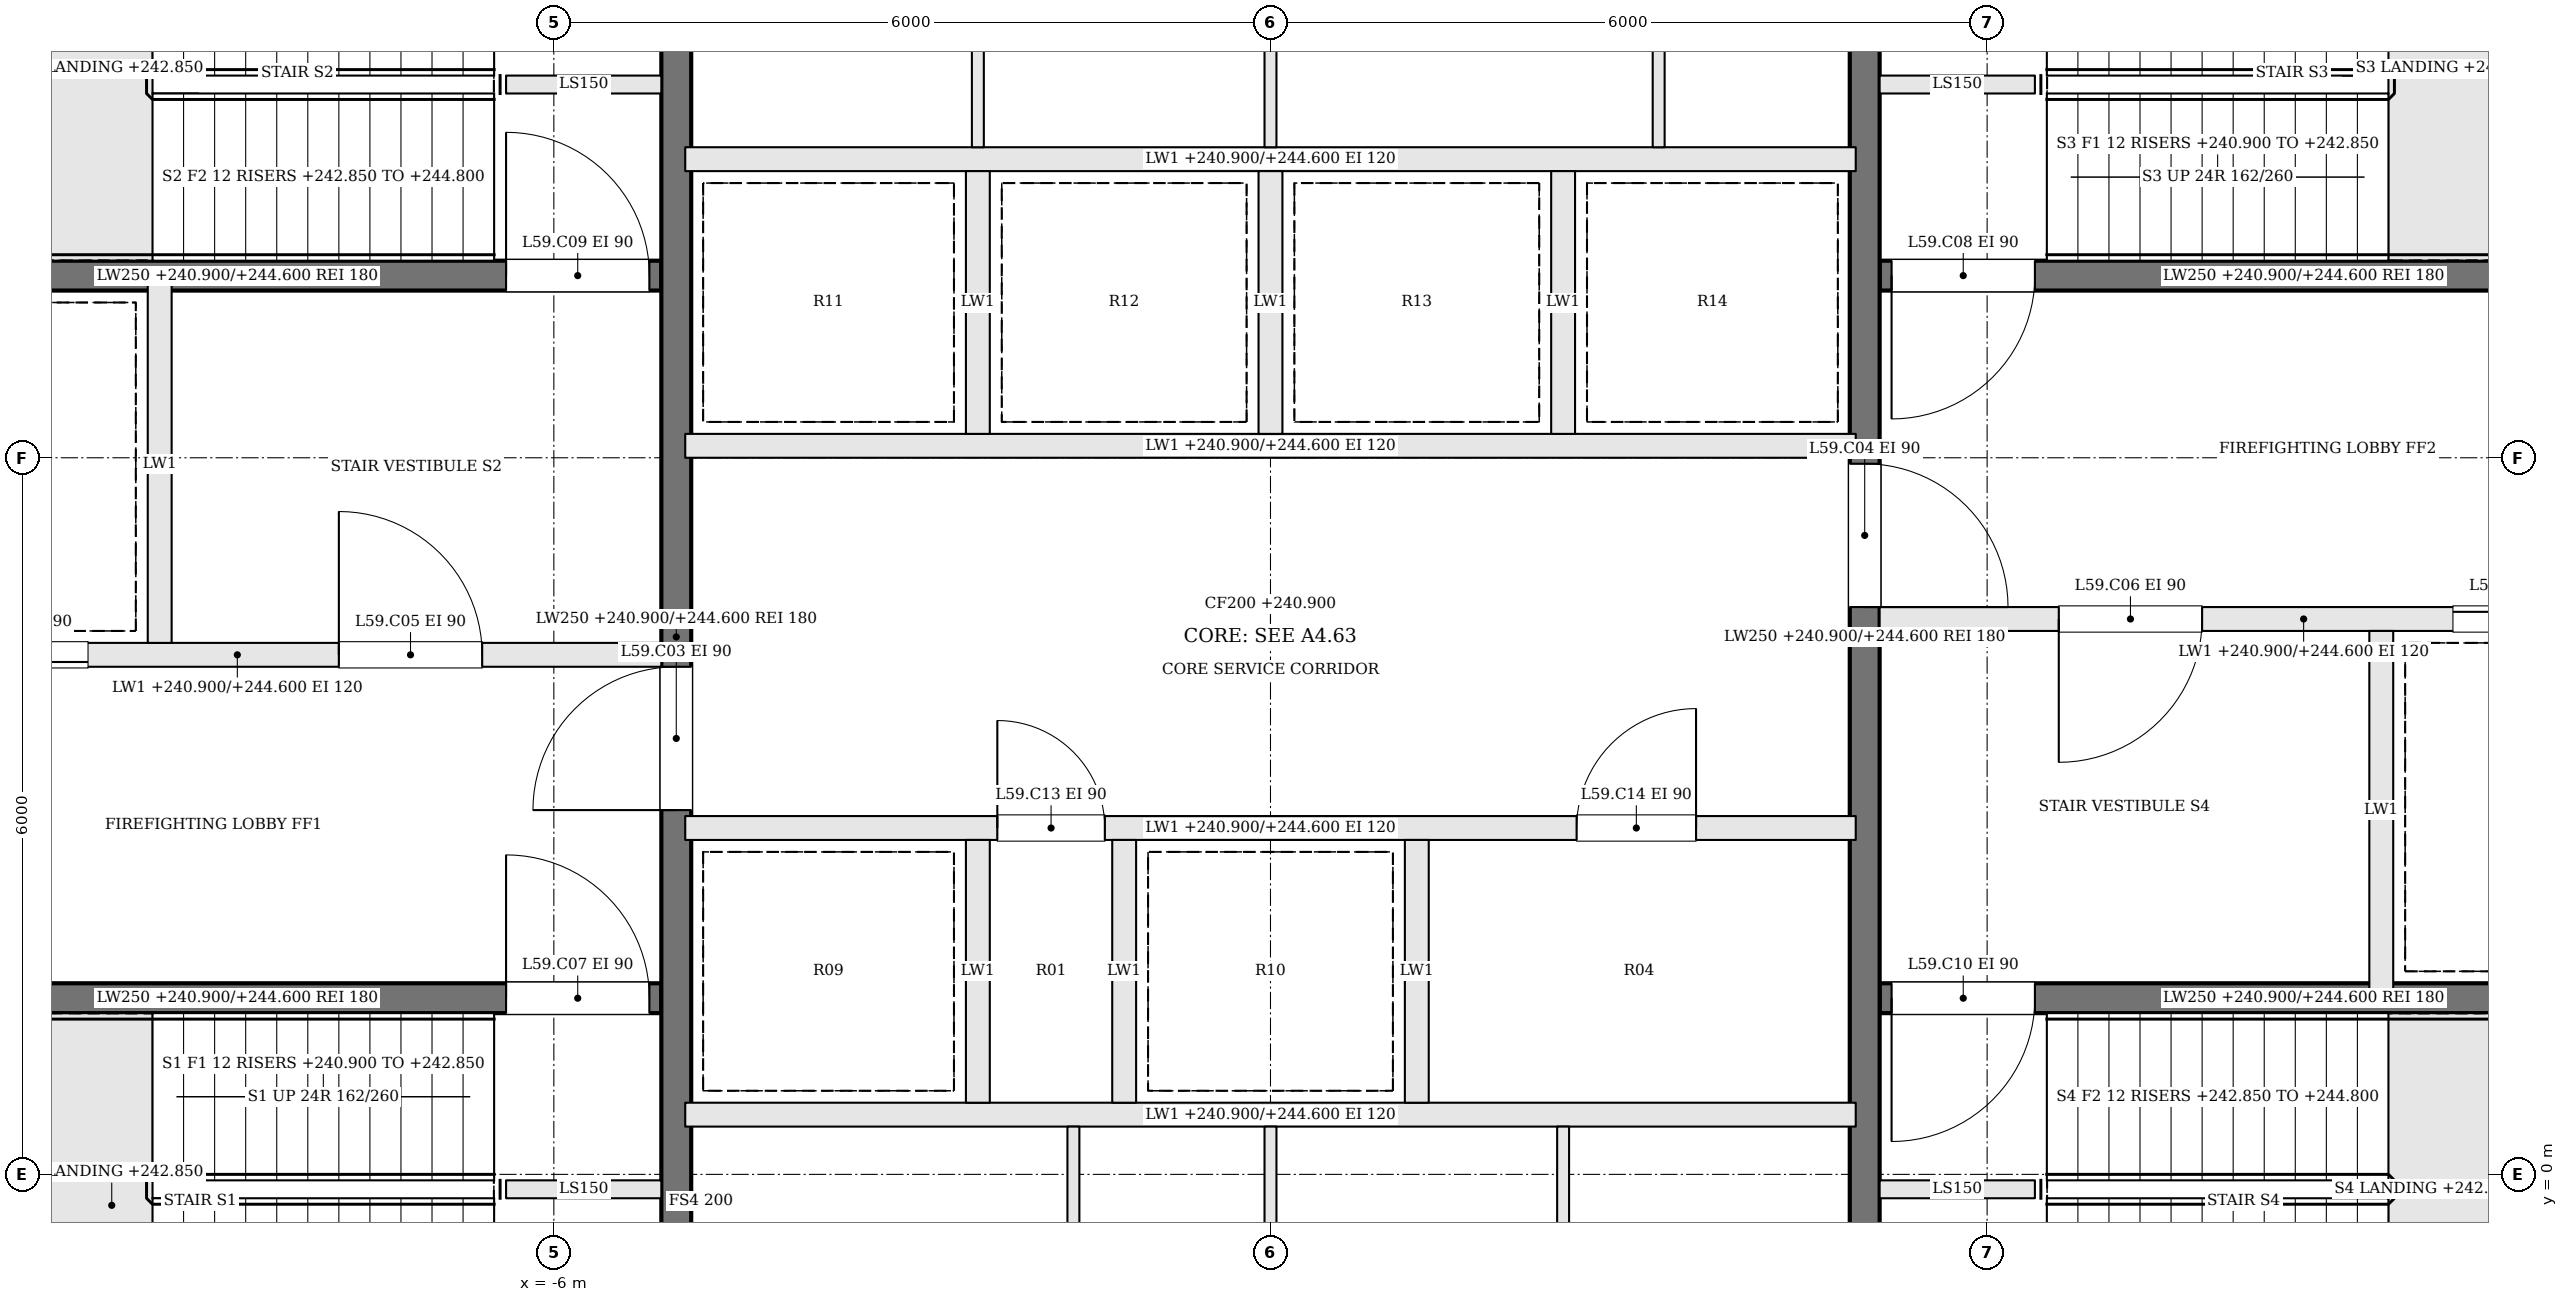
"""IFC4 building model, lengths in metres.
Left out: names, types, materials, properties, quantities, classifications, styles, units other than length and angle.
Written with IfcOpenShell. Run it as: python <this file> out.ifc"""

import sys

from ifc_helpers import new_model, si_unit, direction, frame, frame_2d, origin, place, context, subcontext, project, spatial, rectangle, extrude, element, fill, save


model = new_model("IFC4")
c1 = context("Model", 3, precision=1e-05, world=origin(), true_north=direction((0.0, 1.0)))
c2 = subcontext(c1, "Body", "Model", "MODEL_VIEW")
j1 = project(units=[si_unit("LENGTHUNIT", "METRE"), si_unit("PLANEANGLEUNIT", "RADIAN")], contexts=[c1])
p1 = place(None, origin())
s1 = spatial("IfcSite", under=j1, at=p1, CompositionType="ELEMENT")
p2 = place(p1, origin())
s2 = spatial("IfcBuilding", under=s1, at=p2, CompositionType="ELEMENT")
p3 = place(p2, frame((0.0, 0.0, 240.9)))
s3 = spatial("IfcBuildingStorey", under=s2, at=p3, CompositionType="ELEMENT", Elevation=240.9)
for number, where, z_axis, x_axis in (
    (1, (-6.4, -0.125, 0.0), (0.0, 0.0, 1.0), (1.0, 0.0, 0.0)),
    (2, (6.4, 9.125, 0.0), (0.0, 0.0, 1.0), (-1.0, 0.0, 0.0)),
    (3, (-6.4, 9.125, 0.0), (0.0, 0.0, 1.0), (1.0, 0.0, 0.0)),
    (4, (6.4, -0.125, 0.0), (0.0, 0.0, 1.0), (-1.0, 0.0, 0.0)),
):
    element("IfcWall", number, at=place(p3, frame(where, z_axis=z_axis, x_axis=x_axis)), inside=s3, PredefinedType="SOLIDWALL", context=c2, shape_type="SweptSolid", body=[
        extrude(rectangle(XDim=1.3, YDim=0.15, at=frame_2d((0.65, 0.0))), origin(), (0.0, 0.0, 1.0), 3.7),
    ])
p4 = place(p3, frame((-12.2, 1.475, 0.0), z_axis=(0.0, 0.0, 1.0), x_axis=(1.0, 0.0, 0.0)))
e5 = element("IfcWall", 5, at=p4, inside=s3, PredefinedType="SOLIDWALL", context=c2, shape_type="SweptSolid", body=[
    extrude(rectangle(XDim=7.1, YDim=0.25, at=frame_2d((3.55, 0.0))), origin(), (0.0, 0.0, 1.0), 3.7),
])
p5 = place(p4, frame((5.8, 0.0, 0.0)))
e6 = element("IfcOpeningElement", 6, at=p5, cuts=e5, PredefinedType="OPENING", context=c2, shape_type="SweptSolid", body=[
    extrude(rectangle(XDim=1.2, YDim=2.1, at=frame_2d((0.6, 1.05))), frame((0.0, 0.135, 0.0), z_axis=(0.0, -1.0, 0.0), x_axis=(1.0, 0.0, 0.0)), (0.0, 0.0, 1.0), 0.27),
])
p6 = place(p3, frame((12.2, 7.525, 0.0), z_axis=(0.0, 0.0, 1.0), x_axis=(-1.0, 0.0, 0.0)))
e7 = element("IfcWall", 7, at=p6, inside=s3, PredefinedType="SOLIDWALL", context=c2, shape_type="SweptSolid", body=[
    extrude(rectangle(XDim=7.1, YDim=0.25, at=frame_2d((3.55, 0.0))), origin(), (0.0, 0.0, 1.0), 3.7),
])
p7 = place(p6, frame((5.8, 0.0, 0.0)))
e8 = element("IfcOpeningElement", 8, at=p7, cuts=e7, PredefinedType="OPENING", context=c2, shape_type="SweptSolid", body=[
    extrude(rectangle(XDim=1.2, YDim=2.1, at=frame_2d((0.6, 1.05))), frame((0.0, 0.135, 0.0), z_axis=(0.0, -1.0, 0.0), x_axis=(1.0, 0.0, 0.0)), (0.0, 0.0, 1.0), 0.27),
])
p8 = place(p3, frame((-12.2, 4.35, 0.0), z_axis=(0.0, 0.0, 1.0), x_axis=(1.0, 0.0, 0.0)))
e9 = element("IfcWall", 9, at=p8, inside=s3, PredefinedType="SOLIDWALL", context=c2, shape_type="SweptSolid", body=[
    extrude(rectangle(XDim=7.1, YDim=0.2, at=frame_2d((3.55, 0.0))), origin(), (0.0, 0.0, 1.0), 3.7),
])
p9 = place(p8, frame((4.4, 0.0, 0.0)))
e10 = element("IfcOpeningElement", 10, at=p9, cuts=e9, PredefinedType="OPENING", context=c2, shape_type="SweptSolid", body=[
    extrude(rectangle(XDim=1.2, YDim=2.1, at=frame_2d((0.6, 1.05))), frame((0.0, 0.11, 0.0), z_axis=(0.0, -1.0, 0.0), x_axis=(1.0, 0.0, 0.0)), (0.0, 0.0, 1.0), 0.22),
])
p10 = place(p8, frame((1.1, 0.0, 0.0)))
e11 = element("IfcOpeningElement", 11, at=p10, cuts=e9, PredefinedType="OPENING", context=c2, shape_type="SweptSolid", body=[
    extrude(rectangle(XDim=1.2, YDim=2.1, at=frame_2d((0.6, 1.05))), frame((0.0, 0.11, 0.0), z_axis=(0.0, -1.0, 0.0), x_axis=(1.0, 0.0, 0.0)), (0.0, 0.0, 1.0), 0.22),
])
p11 = place(p3, frame((12.2, 4.65, 0.0), z_axis=(0.0, 0.0, 1.0), x_axis=(-1.0, 0.0, 0.0)))
e12 = element("IfcWall", 12, at=p11, inside=s3, PredefinedType="SOLIDWALL", context=c2, shape_type="SweptSolid", body=[
    extrude(rectangle(XDim=7.1, YDim=0.2, at=frame_2d((3.55, 0.0))), origin(), (0.0, 0.0, 1.0), 3.7),
])
p12 = place(p11, frame((4.4, 0.0, 0.0)))
e13 = element("IfcOpeningElement", 13, at=p12, cuts=e12, PredefinedType="OPENING", context=c2, shape_type="SweptSolid", body=[
    extrude(rectangle(XDim=1.2, YDim=2.1, at=frame_2d((0.6, 1.05))), frame((0.0, 0.11, 0.0), z_axis=(0.0, -1.0, 0.0), x_axis=(1.0, 0.0, 0.0)), (0.0, 0.0, 1.0), 0.22),
])
p13 = place(p11, frame((1.1, 0.0, 0.0)))
e14 = element("IfcOpeningElement", 14, at=p13, cuts=e12, PredefinedType="OPENING", context=c2, shape_type="SweptSolid", body=[
    extrude(rectangle(XDim=1.2, YDim=2.1, at=frame_2d((0.6, 1.05))), frame((0.0, 0.11, 0.0), z_axis=(0.0, -1.0, 0.0), x_axis=(1.0, 0.0, 0.0)), (0.0, 0.0, 1.0), 0.22),
])
p14 = place(p3, frame((-12.2, 7.525, 0.0), z_axis=(0.0, 0.0, 1.0), x_axis=(1.0, 0.0, 0.0)))
e15 = element("IfcWall", 15, at=p14, inside=s3, PredefinedType="SOLIDWALL", context=c2, shape_type="SweptSolid", body=[
    extrude(rectangle(XDim=7.1, YDim=0.25, at=frame_2d((3.55, 0.0))), origin(), (0.0, 0.0, 1.0), 3.7),
])
p15 = place(p14, frame((5.8, 0.0, 0.0)))
e16 = element("IfcOpeningElement", 16, at=p15, cuts=e15, PredefinedType="OPENING", context=c2, shape_type="SweptSolid", body=[
    extrude(rectangle(XDim=1.2, YDim=2.1, at=frame_2d((0.6, 1.05))), frame((0.0, 0.135, 0.0), z_axis=(0.0, -1.0, 0.0), x_axis=(1.0, 0.0, 0.0)), (0.0, 0.0, 1.0), 0.27),
])
p16 = place(p3, frame((12.2, 1.475, 0.0), z_axis=(0.0, 0.0, 1.0), x_axis=(-1.0, 0.0, 0.0)))
e17 = element("IfcWall", 17, at=p16, inside=s3, PredefinedType="SOLIDWALL", context=c2, shape_type="SweptSolid", body=[
    extrude(rectangle(XDim=7.1, YDim=0.25, at=frame_2d((3.55, 0.0))), origin(), (0.0, 0.0, 1.0), 3.7),
])
p17 = place(p16, frame((5.8, 0.0, 0.0)))
e18 = element("IfcOpeningElement", 18, at=p17, cuts=e17, PredefinedType="OPENING", context=c2, shape_type="SweptSolid", body=[
    extrude(rectangle(XDim=1.2, YDim=2.1, at=frame_2d((0.6, 1.05))), frame((0.0, 0.135, 0.0), z_axis=(0.0, -1.0, 0.0), x_axis=(1.0, 0.0, 0.0)), (0.0, 0.0, 1.0), 0.27),
])
for number, where, z_axis, x_axis in (
    (19, (-9.3, 4.45, 0.0), (0.0, 0.0, 1.0), (0.0, 1.0, 0.0)),
    (20, (9.3, 4.55, 0.0), (0.0, 0.0, 1.0), (0.0, -1.0, 0.0)),
):
    element("IfcWall", number, at=place(p3, frame(where, z_axis=z_axis, x_axis=x_axis)), inside=s3, PredefinedType="SOLIDWALL", context=c2, shape_type="SweptSolid", body=[
        extrude(rectangle(XDim=3.0, YDim=0.2, at=frame_2d((1.5, 0.0))), origin(), (0.0, 0.0, 1.0), 3.7),
    ])
p18 = place(p3, frame((-4.975, -2.2, 0.0), z_axis=(0.0, 0.0, 1.0), x_axis=(0.0, 1.0, 0.0)))
e21 = element("IfcWall", 21, at=p18, inside=s3, PredefinedType="SOLIDWALL", context=c2, shape_type="SweptSolid", body=[
    extrude(rectangle(XDim=13.4, YDim=0.25, at=frame_2d((6.7, 0.0))), origin(), (0.0, 0.0, 1.0), 3.7),
])
p19 = place(p18, frame((5.25, 0.0, 0.0)))
e22 = element("IfcOpeningElement", 22, at=p19, cuts=e21, PredefinedType="OPENING", context=c2, shape_type="SweptSolid", body=[
    extrude(rectangle(XDim=1.2, YDim=2.1, at=frame_2d((0.6, 1.05))), frame((0.0, 0.135, 0.0), z_axis=(0.0, -1.0, 0.0), x_axis=(1.0, 0.0, 0.0)), (0.0, 0.0, 1.0), 0.27),
])
p20 = place(p3, frame((4.975, 11.2, 0.0), z_axis=(0.0, 0.0, 1.0), x_axis=(0.0, -1.0, 0.0)))
e23 = element("IfcWall", 23, at=p20, inside=s3, PredefinedType="SOLIDWALL", context=c2, shape_type="SweptSolid", body=[
    extrude(rectangle(XDim=13.4, YDim=0.25, at=frame_2d((6.7, 0.0))), origin(), (0.0, 0.0, 1.0), 3.7),
])
p21 = place(p20, frame((5.25, 0.0, 0.0)))
e24 = element("IfcOpeningElement", 24, at=p21, cuts=e23, PredefinedType="OPENING", context=c2, shape_type="SweptSolid", body=[
    extrude(rectangle(XDim=1.2, YDim=2.1, at=frame_2d((0.6, 1.05))), frame((0.0, 0.135, 0.0), z_axis=(0.0, -1.0, 0.0), x_axis=(1.0, 0.0, 0.0)), (0.0, 0.0, 1.0), 0.27),
])
p22 = place(p3, frame((-4.9, 0.5, 0.0), z_axis=(0.0, 0.0, 1.0), x_axis=(1.0, 0.0, 0.0)))
e25 = element("IfcWall", 25, at=p22, inside=s3, PredefinedType="SOLIDWALL", context=c2, shape_type="SweptSolid", body=[
    extrude(rectangle(XDim=9.8, YDim=0.2, at=frame_2d((4.9, 0.0))), origin(), (0.0, 0.0, 1.0), 3.7),
])
p23 = place(p3, frame((-4.9, 2.9, 0.0), z_axis=(0.0, 0.0, 1.0), x_axis=(1.0, 0.0, 0.0)))
e26 = element("IfcWall", 26, at=p23, inside=s3, PredefinedType="SOLIDWALL", context=c2, shape_type="SweptSolid", body=[
    extrude(rectangle(XDim=9.8, YDim=0.2, at=frame_2d((4.9, 0.0))), origin(), (0.0, 0.0, 1.0), 3.7),
])
p24 = place(p23, frame((2.613, 0.0, 0.0)))
e27 = element("IfcOpeningElement", 27, at=p24, cuts=e26, PredefinedType="OPENING", context=c2, shape_type="SweptSolid", body=[
    extrude(rectangle(XDim=0.9, YDim=2.1, at=frame_2d((0.45, 1.05))), frame((0.0, 0.11, 0.0), z_axis=(0.0, -1.0, 0.0), x_axis=(1.0, 0.0, 0.0)), (0.0, 0.0, 1.0), 0.22),
])
p25 = place(p23, frame((7.463, 0.0, 0.0)))
e28 = element("IfcOpeningElement", 28, at=p25, cuts=e26, PredefinedType="OPENING", context=c2, shape_type="SweptSolid", body=[
    extrude(rectangle(XDim=1.0, YDim=2.1, at=frame_2d((0.5, 1.05))), frame((0.0, 0.11, 0.0), z_axis=(0.0, -1.0, 0.0), x_axis=(1.0, 0.0, 0.0)), (0.0, 0.0, 1.0), 0.22),
])
for number, where, z_axis, x_axis in (
    (29, (-4.9, 6.1, 0.0), (0.0, 0.0, 1.0), (1.0, 0.0, 0.0)),
    (30, (-4.9, 8.5, 0.0), (0.0, 0.0, 1.0), (1.0, 0.0, 0.0)),
):
    element("IfcWall", number, at=place(p3, frame(where, z_axis=z_axis, x_axis=x_axis)), inside=s3, PredefinedType="SOLIDWALL", context=c2, shape_type="SweptSolid", body=[
        extrude(rectangle(XDim=9.8, YDim=0.2, at=frame_2d((4.9, 0.0))), origin(), (0.0, 0.0, 1.0), 3.7),
    ])
for number, where, z_axis, x_axis in (
    (31, (-2.45, 0.6, 0.0), (0.0, 0.0, 1.0), (0.0, 1.0, 0.0)),
    (32, (-1.225, 0.6, 0.0), (0.0, 0.0, 1.0), (0.0, 1.0, 0.0)),
    (33, (1.225, 0.6, 0.0), (0.0, 0.0, 1.0), (0.0, 1.0, 0.0)),
    (34, (-2.45, 6.2, 0.0), (0.0, 0.0, 1.0), (0.0, 1.0, 0.0)),
    (35, (0.0, 6.2, 0.0), (0.0, 0.0, 1.0), (0.0, 1.0, 0.0)),
    (36, (2.45, 6.2, 0.0), (0.0, 0.0, 1.0), (0.0, 1.0, 0.0)),
):
    element("IfcWall", number, at=place(p3, frame(where, z_axis=z_axis, x_axis=x_axis)), inside=s3, PredefinedType="SOLIDWALL", context=c2, shape_type="SweptSolid", body=[
        extrude(rectangle(XDim=2.2, YDim=0.2, at=frame_2d((1.1, 0.0))), origin(), (0.0, 0.0, 1.0), 3.7),
    ])
for number, where, z_axis, x_axis in (
    (37, (-1.65, -2.2, 0.0), (0.0, 0.0, 1.0), (0.0, 1.0, 0.0)),
    (38, (0.0, -2.2, 0.0), (0.0, 0.0, 1.0), (0.0, 1.0, 0.0)),
    (39, (2.45, -2.2, 0.0), (0.0, 0.0, 1.0), (0.0, 1.0, 0.0)),
    (40, (-2.45, 8.6, 0.0), (0.0, 0.0, 1.0), (0.0, 1.0, 0.0)),
    (41, (0.0, 8.6, 0.0), (0.0, 0.0, 1.0), (0.0, 1.0, 0.0)),
    (42, (3.25, 8.6, 0.0), (0.0, 0.0, 1.0), (0.0, 1.0, 0.0)),
):
    element("IfcWall", number, at=place(p3, frame(where, z_axis=z_axis, x_axis=x_axis)), inside=s3, PredefinedType="PARTITIONING", context=c2, shape_type="SweptSolid", body=[
        extrude(rectangle(XDim=2.6, YDim=0.1, at=frame_2d((1.3, 0.0))), origin(), (0.0, 0.0, 1.0), 3.7),
    ])
p26 = place(p19, origin())
e43 = element("IfcDoor", 43, at=p26, inside=s3, OperationType="SINGLE_SWING_LEFT", PredefinedType="DOOR", context=c2, shape_type="SweptSolid", body=[
    extrude(rectangle(XDim=1.2, YDim=2.1, at=frame_2d((0.6, 1.05))), frame((0.0, 0.025, 0.0), z_axis=(0.0, -1.0, 0.0), x_axis=(1.0, 0.0, 0.0)), (0.0, 0.0, 1.0), 0.05),
])
fill(e22, e43)
p27 = place(p21, origin())
e44 = element("IfcDoor", 44, at=p27, inside=s3, OperationType="SINGLE_SWING_RIGHT", PredefinedType="DOOR", context=c2, shape_type="SweptSolid", body=[
    extrude(rectangle(XDim=1.2, YDim=2.1, at=frame_2d((0.6, 1.05))), frame((0.0, 0.025, 0.0), z_axis=(0.0, -1.0, 0.0), x_axis=(1.0, 0.0, 0.0)), (0.0, 0.0, 1.0), 0.05),
])
fill(e24, e44)
p28 = place(p9, origin())
e45 = element("IfcDoor", 45, at=p28, inside=s3, OperationType="SINGLE_SWING_LEFT", PredefinedType="DOOR", context=c2, shape_type="SweptSolid", body=[
    extrude(rectangle(XDim=1.2, YDim=2.1, at=frame_2d((0.6, 1.05))), frame((0.0, 0.025, 0.0), z_axis=(0.0, -1.0, 0.0), x_axis=(1.0, 0.0, 0.0)), (0.0, 0.0, 1.0), 0.05),
])
fill(e10, e45)
p29 = place(p12, origin())
e46 = element("IfcDoor", 46, at=p29, inside=s3, OperationType="SINGLE_SWING_RIGHT", PredefinedType="DOOR", context=c2, shape_type="SweptSolid", body=[
    extrude(rectangle(XDim=1.2, YDim=2.1, at=frame_2d((0.6, 1.05))), frame((0.0, 0.025, 0.0), z_axis=(0.0, -1.0, 0.0), x_axis=(1.0, 0.0, 0.0)), (0.0, 0.0, 1.0), 0.05),
])
fill(e13, e46)
p30 = place(p5, origin())
e47 = element("IfcDoor", 47, at=p30, inside=s3, OperationType="SINGLE_SWING_LEFT", PredefinedType="DOOR", context=c2, shape_type="SweptSolid", body=[
    extrude(rectangle(XDim=1.2, YDim=2.1, at=frame_2d((0.6, 1.05))), frame((0.0, 0.025, 0.0), z_axis=(0.0, -1.0, 0.0), x_axis=(1.0, 0.0, 0.0)), (0.0, 0.0, 1.0), 0.05),
])
fill(e6, e47)
p31 = place(p7, origin())
e48 = element("IfcDoor", 48, at=p31, inside=s3, OperationType="SINGLE_SWING_RIGHT", PredefinedType="DOOR", context=c2, shape_type="SweptSolid", body=[
    extrude(rectangle(XDim=1.2, YDim=2.1, at=frame_2d((0.6, 1.05))), frame((0.0, 0.025, 0.0), z_axis=(0.0, -1.0, 0.0), x_axis=(1.0, 0.0, 0.0)), (0.0, 0.0, 1.0), 0.05),
])
fill(e8, e48)
p32 = place(p15, origin())
e49 = element("IfcDoor", 49, at=p32, inside=s3, OperationType="SINGLE_SWING_LEFT", PredefinedType="DOOR", context=c2, shape_type="SweptSolid", body=[
    extrude(rectangle(XDim=1.2, YDim=2.1, at=frame_2d((0.6, 1.05))), frame((0.0, 0.025, 0.0), z_axis=(0.0, -1.0, 0.0), x_axis=(1.0, 0.0, 0.0)), (0.0, 0.0, 1.0), 0.05),
])
fill(e16, e49)
p33 = place(p17, origin())
e50 = element("IfcDoor", 50, at=p33, inside=s3, OperationType="SINGLE_SWING_RIGHT", PredefinedType="DOOR", context=c2, shape_type="SweptSolid", body=[
    extrude(rectangle(XDim=1.2, YDim=2.1, at=frame_2d((0.6, 1.05))), frame((0.0, 0.025, 0.0), z_axis=(0.0, -1.0, 0.0), x_axis=(1.0, 0.0, 0.0)), (0.0, 0.0, 1.0), 0.05),
])
fill(e18, e50)
p34 = place(p10, origin())
e51 = element("IfcDoor", 51, at=p34, inside=s3, OperationType="SLIDING_TO_RIGHT", PredefinedType="DOOR", context=c2, shape_type="SweptSolid", body=[
    extrude(rectangle(XDim=1.2, YDim=2.1, at=frame_2d((0.6, 1.05))), frame((0.0, 0.025, 0.0), z_axis=(0.0, -1.0, 0.0), x_axis=(1.0, 0.0, 0.0)), (0.0, 0.0, 1.0), 0.05),
])
fill(e11, e51)
p35 = place(p13, origin())
e52 = element("IfcDoor", 52, at=p35, inside=s3, OperationType="SLIDING_TO_RIGHT", PredefinedType="DOOR", context=c2, shape_type="SweptSolid", body=[
    extrude(rectangle(XDim=1.2, YDim=2.1, at=frame_2d((0.6, 1.05))), frame((0.0, 0.025, 0.0), z_axis=(0.0, -1.0, 0.0), x_axis=(1.0, 0.0, 0.0)), (0.0, 0.0, 1.0), 0.05),
])
fill(e14, e52)
p36 = place(p24, origin())
e53 = element("IfcDoor", 53, at=p36, inside=s3, OperationType="SINGLE_SWING_LEFT", PredefinedType="DOOR", context=c2, shape_type="SweptSolid", body=[
    extrude(rectangle(XDim=0.9, YDim=2.1, at=frame_2d((0.45, 1.05))), frame((0.0, 0.025, 0.0), z_axis=(0.0, -1.0, 0.0), x_axis=(1.0, 0.0, 0.0)), (0.0, 0.0, 1.0), 0.05),
])
fill(e27, e53)
p37 = place(p25, origin())
e54 = element("IfcDoor", 54, at=p37, inside=s3, OperationType="SINGLE_SWING_RIGHT", PredefinedType="DOOR", context=c2, shape_type="SweptSolid", body=[
    extrude(rectangle(XDim=1.0, YDim=2.1, at=frame_2d((0.5, 1.05))), frame((0.0, 0.025, 0.0), z_axis=(0.0, -1.0, 0.0), x_axis=(1.0, 0.0, 0.0)), (0.0, 0.0, 1.0), 0.05),
])
fill(e28, e54)
save(model, sys.argv[1])
